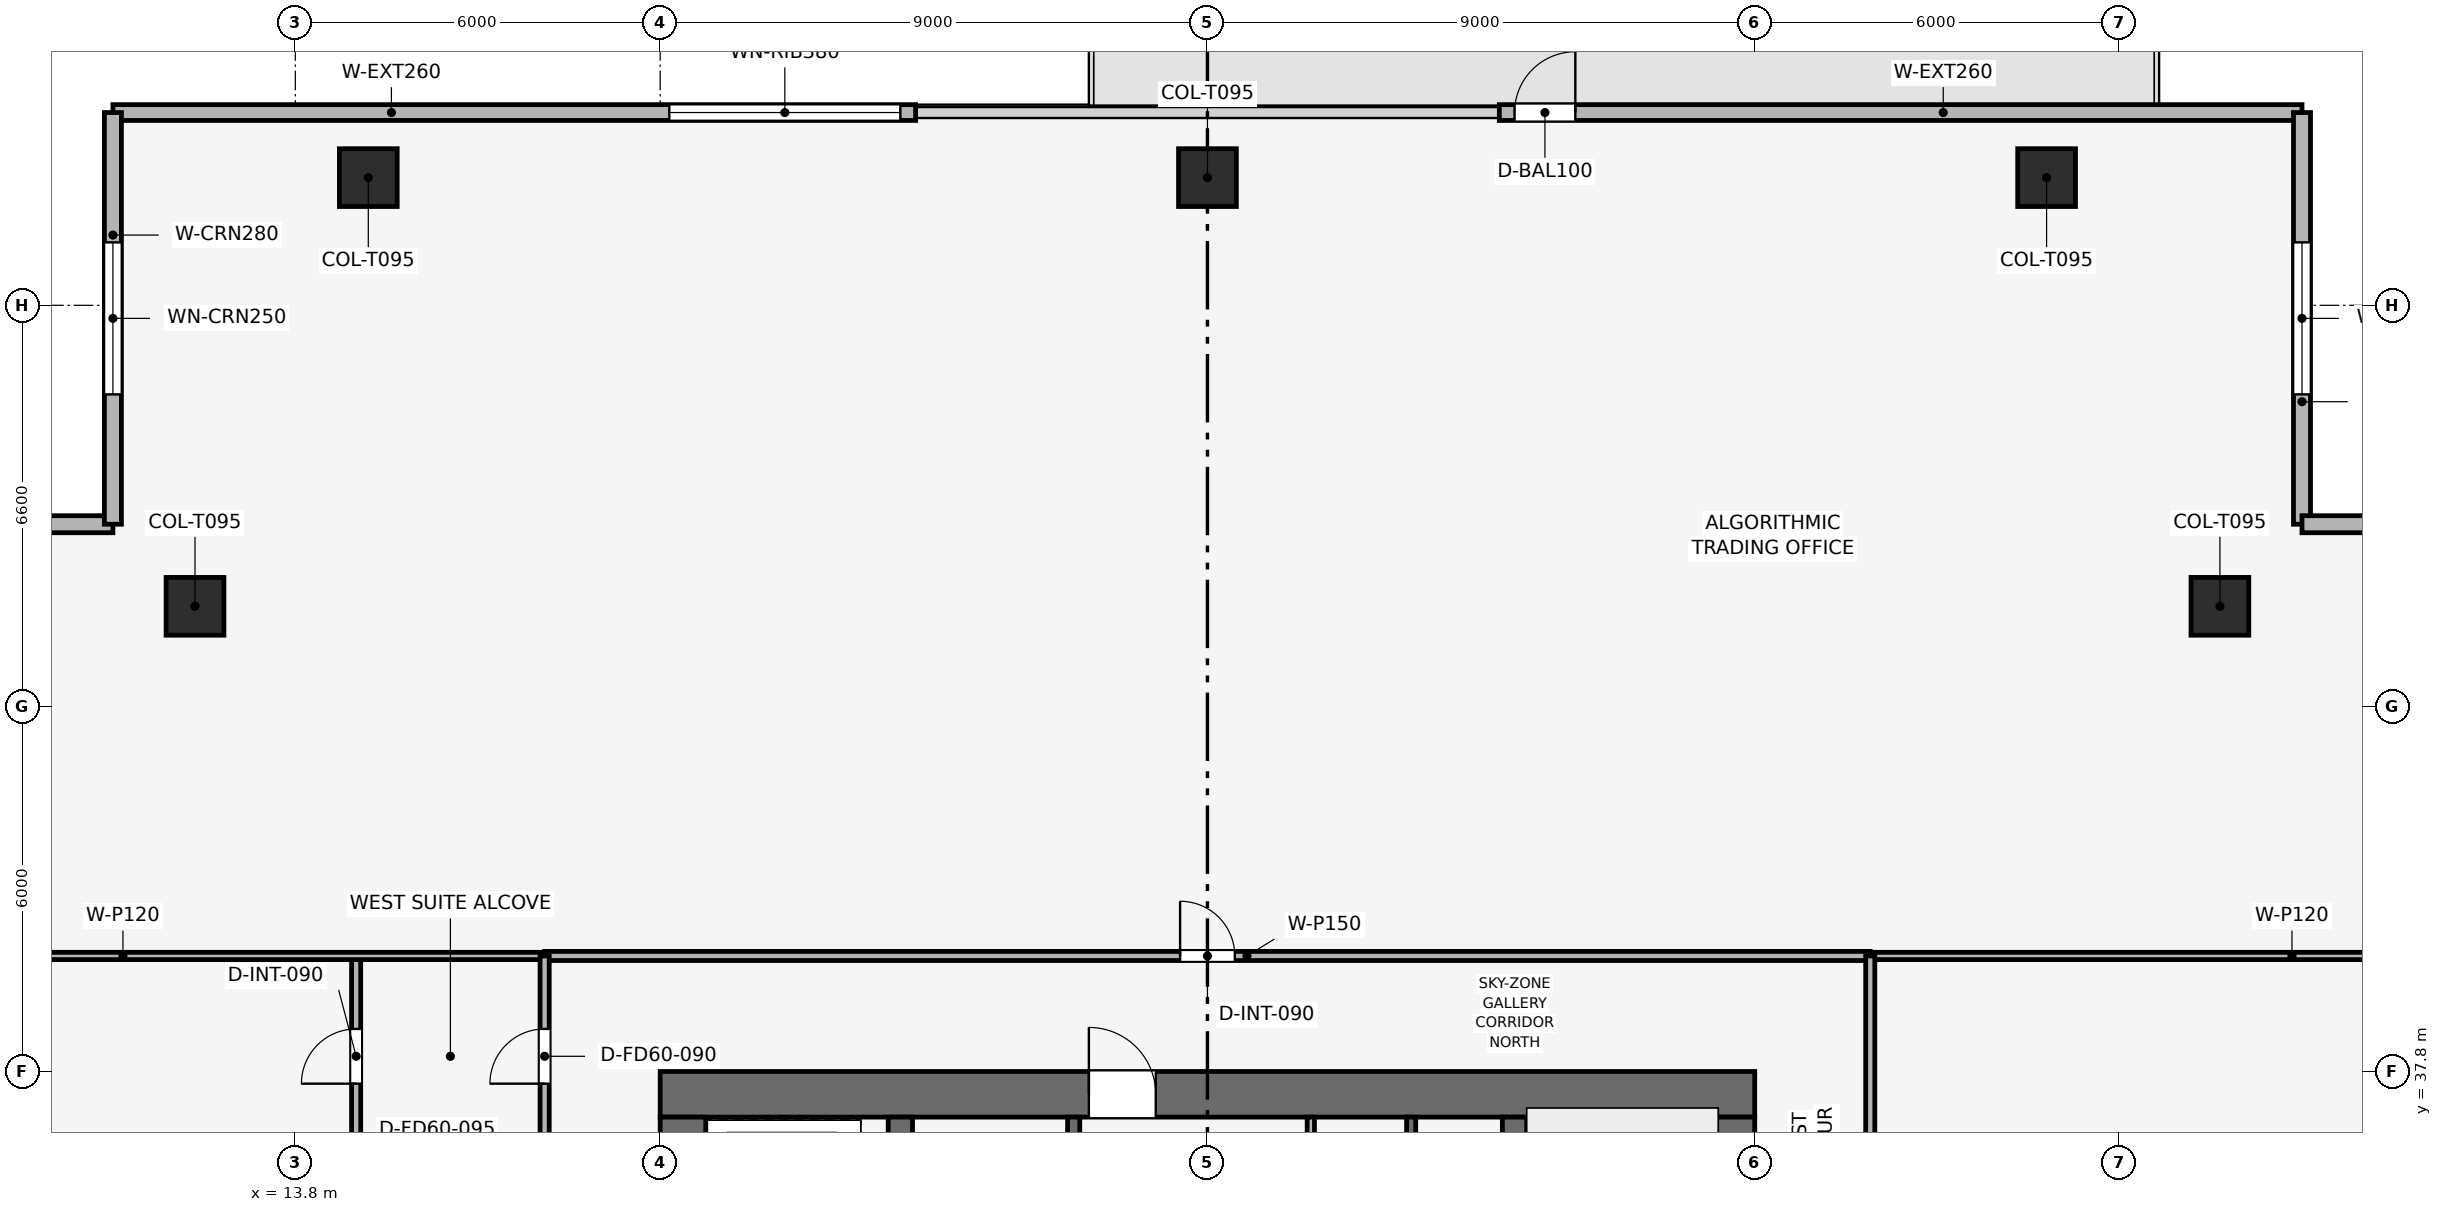
"""IFC4 building model, lengths in metres.
Left out: names, types, materials, properties, quantities, classifications, styles, units other than length and angle.
Written with IfcOpenShell. Run it as: python <this file> out.ifc"""

import sys

from ifc_helpers import new_model, si_unit, direction, frame, frame_2d, origin, origin_2d, place, context, subcontext, project, spatial, rectangle, extrude, element, fill, save


model = new_model("IFC4")
c1 = context("Model", 3, precision=1e-05, world=origin(), true_north=direction((0.0, 1.0)))
c2 = subcontext(c1, "Body", "Model", "MODEL_VIEW")
j1 = project(units=[si_unit("LENGTHUNIT", "METRE"), si_unit("PLANEANGLEUNIT", "RADIAN")], contexts=[c1])
p1 = place(None, origin())
s1 = spatial("IfcSite", under=j1, at=p1, CompositionType="ELEMENT")
p2 = place(p1, origin())
s2 = spatial("IfcBuilding", under=s1, at=p2, CompositionType="ELEMENT")
p3 = place(p2, frame((0.0, 0.0, 276.6)))
s3 = spatial("IfcBuildingStorey", under=s2, at=p3, CompositionType="ELEMENT", Elevation=276.6)
p4 = place(p3, frame((19.8, 37.425, 0.0), z_axis=(0.0, 0.0, 1.0), x_axis=(1.0, 0.0, 0.0)))
e1 = element("IfcWall", 1, at=p4, inside=s3, PredefinedType="SHEAR", context=c2, shape_type="SweptSolid", body=[
    extrude(rectangle(XDim=18.0, YDim=0.75, at=frame_2d((9.0, 0.0))), origin(), (0.0, 0.0, 1.0), 3.75),
])
p5 = place(p4, frame((7.05, 0.0, 0.0)))
e2 = element("IfcOpeningElement", 2, at=p5, cuts=e1, PredefinedType="OPENING", context=c2, shape_type="SweptSolid", body=[
    extrude(rectangle(XDim=1.1, YDim=2.15, at=frame_2d((0.55, 1.075))), frame((0.0, 0.385, 0.0), z_axis=(0.0, -1.0, 0.0), x_axis=(1.0, 0.0, 0.0)), (0.0, 0.0, 1.0), 0.77),
])
p6 = place(p3, frame((20.175, 20.55, 0.0), z_axis=(0.0, 0.0, 1.0), x_axis=(0.0, 1.0, 0.0)))
e3 = element("IfcWall", 3, at=p6, inside=s3, PredefinedType="SHEAR", context=c2, shape_type="SweptSolid", body=[
    extrude(rectangle(XDim=16.5, YDim=0.75, at=frame_2d((8.25, 0.0))), origin(), (0.0, 0.0, 1.0), 3.75),
])
p7 = place(p6, frame((10.25, 0.0, 0.0)))
e4 = element("IfcOpeningElement", 4, at=p7, cuts=e3, PredefinedType="OPENING", context=c2, shape_type="SweptSolid", body=[
    extrude(rectangle(XDim=1.1, YDim=2.15, at=frame_2d((0.55, 1.075))), frame((0.0, 0.385, 0.0), z_axis=(0.0, -1.0, 0.0), x_axis=(1.0, 0.0, 0.0)), (0.0, 0.0, 1.0), 0.77),
])
p8 = place(p3, frame((37.425, 20.55, 0.0), z_axis=(0.0, 0.0, 1.0), x_axis=(0.0, 1.0, 0.0)))
e5 = element("IfcWall", 5, at=p8, inside=s3, PredefinedType="SHEAR", context=c2, shape_type="SweptSolid", body=[
    extrude(rectangle(XDim=16.5, YDim=0.75, at=frame_2d((8.25, 0.0))), origin(), (0.0, 0.0, 1.0), 3.75),
])
p9 = place(p8, frame((4.75, 0.0, 0.0)))
e6 = element("IfcOpeningElement", 6, at=p9, cuts=e5, PredefinedType="OPENING", context=c2, shape_type="SweptSolid", body=[
    extrude(rectangle(XDim=1.1, YDim=2.15, at=frame_2d((0.55, 1.075))), frame((0.0, 0.385, 0.0), z_axis=(0.0, -1.0, 0.0), x_axis=(1.0, 0.0, 0.0)), (0.0, 0.0, 1.0), 0.77),
])
for number, where, z_axis, x_axis in (
    (7, (23.75, 20.55, 0.0), (0.0, 0.0, 1.0), (0.0, 1.0, 0.0)),
    (8, (33.85, 20.55, 0.0), (0.0, 0.0, 1.0), (0.0, 1.0, 0.0)),
):
    element("IfcWall", number, at=place(p3, frame(where, z_axis=z_axis, x_axis=x_axis)), inside=s3, PredefinedType="SHEAR", context=c2, shape_type="SweptSolid", body=[
        extrude(rectangle(XDim=16.5, YDim=0.4, at=frame_2d((8.25, 0.0))), origin(), (0.0, 0.0, 1.0), 3.75),
    ])
for number, where, z_axis, x_axis in (
    (9, (42.6, 52.5, 0.003), (0.0, 0.0, 1.0), (1.0, 0.0, 0.0)),
    (10, (28.8, 52.5, 0.003), (0.0, 0.0, 1.0), (1.0, 0.0, 0.0)),
    (11, (15.0, 52.5, 0.003), (0.0, 0.0, 1.0), (1.0, 0.0, 0.0)),
    (12, (45.45, 45.45, 0.003), (0.0, 0.0, 1.0), (1.0, 0.0, 0.0)),
    (13, (12.15, 45.45, 0.003), (0.0, 0.0, 1.0), (1.0, 0.0, 0.0)),
):
    element("IfcColumn", number, at=place(p3, frame(where, z_axis=z_axis, x_axis=x_axis)), inside=s3, PredefinedType="COLUMN", context=c2, shape_type="SweptSolid", body=[
        extrude(rectangle(XDim=0.95, YDim=0.95, at=origin_2d()), origin(), (0.0, 0.0, 1.0), 3.494),
    ])
p10 = place(p3, frame((10.8, 53.57, 0.0), z_axis=(0.0, 0.0, 1.0), x_axis=(1.0, 0.0, 0.0)))
e14 = element("IfcWall", 14, at=p10, inside=s3, PredefinedType="SOLIDWALL", context=c2, shape_type="SweptSolid", body=[
    extrude(rectangle(XDim=13.2, YDim=0.26, at=frame_2d((6.6, 0.0))), origin(), (0.0, 0.0, 1.0), 3.5),
])
p11 = place(p10, frame((9.15, 0.0, 0.9)))
e15 = element("IfcOpeningElement", 15, at=p11, cuts=e14, PredefinedType="OPENING", context=c2, shape_type="SweptSolid", body=[
    extrude(rectangle(XDim=3.8, YDim=1.9, at=frame_2d((1.9, 0.95))), frame((0.0, 0.14, 0.0), z_axis=(0.0, -1.0, 0.0), x_axis=(1.0, 0.0, 0.0)), (0.0, 0.0, 1.0), 0.28),
])
p12 = place(p3, frame((33.6, 53.57, 0.0), z_axis=(0.0, 0.0, 1.0), x_axis=(1.0, 0.0, 0.0)))
e16 = element("IfcWall", 16, at=p12, inside=s3, PredefinedType="SOLIDWALL", context=c2, shape_type="SweptSolid", body=[
    extrude(rectangle(XDim=13.2, YDim=0.26, at=frame_2d((6.6, 0.0))), origin(), (0.0, 0.0, 1.0), 3.5),
])
p13 = place(p12, frame((0.25, 0.0, 0.0)))
e17 = element("IfcOpeningElement", 17, at=p13, cuts=e16, PredefinedType="OPENING", context=c2, shape_type="SweptSolid", body=[
    extrude(rectangle(XDim=1.0, YDim=2.2, at=frame_2d((0.5, 1.1))), frame((0.0, 0.14, 0.0), z_axis=(0.0, -1.0, 0.0), x_axis=(1.0, 0.0, 0.0)), (0.0, 0.0, 1.0), 0.28),
])
p14 = place(p3, frame((4.03, 46.8, 0.0), z_axis=(0.0, 0.0, 1.0), x_axis=(1.0, 0.0, 0.0)))
e18 = element("IfcWall", 18, at=p14, inside=s3, PredefinedType="SOLIDWALL", context=c2, shape_type="SweptSolid", body=[
    extrude(rectangle(XDim=6.77, YDim=0.28, at=frame_2d((3.385, 0.0))), origin(), (0.0, 0.0, 1.0), 3.5),
])
p15 = place(p14, frame((2.135, 0.0, 0.9)))
e19 = element("IfcOpeningElement", 19, at=p15, cuts=e18, PredefinedType="OPENING", context=c2, shape_type="SweptSolid", body=[
    extrude(rectangle(XDim=2.5, YDim=1.9, at=frame_2d((1.25, 0.95))), frame((0.0, 0.15, 0.0), z_axis=(0.0, -1.0, 0.0), x_axis=(1.0, 0.0, 0.0)), (0.0, 0.0, 1.0), 0.3),
])
p16 = place(p3, frame((10.8, 46.8, 0.0), z_axis=(0.0, 0.0, 1.0), x_axis=(0.0, 1.0, 0.0)))
e20 = element("IfcWall", 20, at=p16, inside=s3, PredefinedType="SOLIDWALL", context=c2, shape_type="SweptSolid", body=[
    extrude(rectangle(XDim=6.77, YDim=0.28, at=frame_2d((3.385, 0.0))), origin(), (0.0, 0.0, 1.0), 3.5),
])
p17 = place(p16, frame((2.135, 0.0, 0.9)))
e21 = element("IfcOpeningElement", 21, at=p17, cuts=e20, PredefinedType="OPENING", context=c2, shape_type="SweptSolid", body=[
    extrude(rectangle(XDim=2.5, YDim=1.9, at=frame_2d((1.25, 0.95))), frame((0.0, 0.15, 0.0), z_axis=(0.0, -1.0, 0.0), x_axis=(1.0, 0.0, 0.0)), (0.0, 0.0, 1.0), 0.3),
])
p18 = place(p3, frame((46.8, 53.57, 0.0), z_axis=(0.0, 0.0, 1.0), x_axis=(0.0, -1.0, 0.0)))
e22 = element("IfcWall", 22, at=p18, inside=s3, PredefinedType="SOLIDWALL", context=c2, shape_type="SweptSolid", body=[
    extrude(rectangle(XDim=6.77, YDim=0.28, at=frame_2d((3.385, 0.0))), origin(), (0.0, 0.0, 1.0), 3.5),
])
p19 = place(p18, frame((2.135, 0.0, 0.9)))
e23 = element("IfcOpeningElement", 23, at=p19, cuts=e22, PredefinedType="OPENING", context=c2, shape_type="SweptSolid", body=[
    extrude(rectangle(XDim=2.5, YDim=1.9, at=frame_2d((1.25, 0.95))), frame((0.0, 0.15, 0.0), z_axis=(0.0, -1.0, 0.0), x_axis=(1.0, 0.0, 0.0)), (0.0, 0.0, 1.0), 0.3),
])
p20 = place(p3, frame((46.8, 46.8, 0.0), z_axis=(0.0, 0.0, 1.0), x_axis=(1.0, 0.0, 0.0)))
e24 = element("IfcWall", 24, at=p20, inside=s3, PredefinedType="SOLIDWALL", context=c2, shape_type="SweptSolid", body=[
    extrude(rectangle(XDim=6.77, YDim=0.28, at=frame_2d((3.385, 0.0))), origin(), (0.0, 0.0, 1.0), 3.5),
])
p21 = place(p20, frame((2.135, 0.0, 0.9)))
e25 = element("IfcOpeningElement", 25, at=p21, cuts=e24, PredefinedType="OPENING", context=c2, shape_type="SweptSolid", body=[
    extrude(rectangle(XDim=2.5, YDim=1.9, at=frame_2d((1.25, 0.95))), frame((0.0, 0.15, 0.0), z_axis=(0.0, -1.0, 0.0), x_axis=(1.0, 0.0, 0.0)), (0.0, 0.0, 1.0), 0.3),
])
p22 = place(p3, frame((32.15, 34.0, 0.0), z_axis=(0.0, 0.0, 1.0), x_axis=(0.0, 1.0, 0.0)))
e26 = element("IfcWall", 26, at=p22, inside=s3, PredefinedType="SHEAR", context=c2, shape_type="SweptSolid", body=[
    extrude(rectangle(XDim=3.05, YDim=0.15, at=frame_2d((1.525, 0.0))), origin(), (0.0, 0.0, 1.0), 3.5),
])
p23 = place(p3, frame((26.6, 34.0, 0.0), z_axis=(0.0, 0.0, 1.0), x_axis=(0.0, 1.0, 0.0)))
e27 = element("IfcWall", 27, at=p23, inside=s3, PredefinedType="SHEAR", context=c2, shape_type="SweptSolid", body=[
    extrude(rectangle(XDim=3.05, YDim=0.2, at=frame_2d((1.525, 0.0))), origin(), (0.0, 0.0, 1.0), 3.5),
])
p24 = place(p23, frame((0.75, 0.0, 0.0)))
e28 = element("IfcOpeningElement", 28, at=p24, cuts=e27, PredefinedType="OPENING", context=c2, shape_type="SweptSolid", body=[
    extrude(rectangle(XDim=1.1, YDim=2.15, at=frame_2d((0.55, 1.075))), frame((0.0, 0.11, 0.0), z_axis=(0.0, -1.0, 0.0), x_axis=(1.0, 0.0, 0.0)), (0.0, 0.0, 1.0), 0.22),
])
p25 = place(p3, frame((30.5, 33.925, 0.0), z_axis=(0.0, 0.0, 1.0), x_axis=(0.0, 1.0, 0.0)))
e29 = element("IfcWall", 29, at=p25, inside=s3, PredefinedType="PARTITIONING", context=c2, shape_type="SweptSolid", body=[
    extrude(rectangle(XDim=3.125, YDim=0.12, at=frame_2d((1.562, 0.0))), origin(), (0.0, 0.0, 1.0), 3.5),
])
p26 = place(p25, frame((0.85, 0.0, 0.0)))
e30 = element("IfcOpeningElement", 30, at=p26, cuts=e29, PredefinedType="OPENING", context=c2, shape_type="SweptSolid", body=[
    extrude(rectangle(XDim=0.9, YDim=2.1, at=frame_2d((0.45, 1.05))), frame((0.0, 0.07, 0.0), z_axis=(0.0, -1.0, 0.0), x_axis=(1.0, 0.0, 0.0)), (0.0, 0.0, 1.0), 0.14),
])
p27 = place(p3, frame((14.8, 28.0, 0.0), z_axis=(0.0, 0.0, 1.0), x_axis=(0.0, 1.0, 0.0)))
e31 = element("IfcWall", 31, at=p27, inside=s3, PredefinedType="PARTITIONING", context=c2, shape_type="SweptSolid", body=[
    extrude(rectangle(XDim=11.7, YDim=0.15, at=frame_2d((5.85, 0.0))), origin(), (0.0, 0.0, 1.0), 3.085),
])
p28 = place(p27, frame((9.6, 0.0, 0.0)))
e32 = element("IfcOpeningElement", 32, at=p28, cuts=e31, PredefinedType="OPENING", context=c2, shape_type="SweptSolid", body=[
    extrude(rectangle(XDim=0.9, YDim=2.1, at=frame_2d((0.45, 1.05))), frame((0.0, 0.085, 0.0), z_axis=(0.0, -1.0, 0.0), x_axis=(1.0, 0.0, 0.0)), (0.0, 0.0, 1.0), 0.17),
])
p29 = place(p3, frame((4.03, 39.7, 0.0), z_axis=(0.0, 0.0, 1.0), x_axis=(1.0, 0.0, 0.0)))
e33 = element("IfcWall", 33, at=p29, inside=s3, PredefinedType="PARTITIONING", context=c2, shape_type="SweptSolid", body=[
    extrude(rectangle(XDim=13.87, YDim=0.12, at=frame_2d((6.935, 0.0))), origin(), (0.0, 0.0, 1.0), 3.085),
])
p30 = place(p3, frame((39.7, 39.7, 0.0), z_axis=(0.0, 0.0, 1.0), x_axis=(1.0, 0.0, 0.0)))
e34 = element("IfcWall", 34, at=p30, inside=s3, PredefinedType="PARTITIONING", context=c2, shape_type="SweptSolid", body=[
    extrude(rectangle(XDim=13.87, YDim=0.12, at=frame_2d((6.935, 0.0))), origin(), (0.0, 0.0, 1.0), 3.085),
])
p31 = place(p3, frame((17.9, 39.7, 0.0), z_axis=(0.0, 0.0, 1.0), x_axis=(1.0, 0.0, 0.0)))
e35 = element("IfcWall", 35, at=p31, inside=s3, PredefinedType="PARTITIONING", context=c2, shape_type="SweptSolid", body=[
    extrude(rectangle(XDim=21.8, YDim=0.15, at=frame_2d((10.9, 0.0))), origin(), (0.0, 0.0, 1.0), 3.085),
])
p32 = place(p31, frame((10.45, 0.0, 0.0)))
e36 = element("IfcOpeningElement", 36, at=p32, cuts=e35, PredefinedType="OPENING", context=c2, shape_type="SweptSolid", body=[
    extrude(rectangle(XDim=0.9, YDim=2.1, at=frame_2d((0.45, 1.05))), frame((0.0, 0.085, 0.0), z_axis=(0.0, -1.0, 0.0), x_axis=(1.0, 0.0, 0.0)), (0.0, 0.0, 1.0), 0.17),
])
p33 = place(p3, frame((17.9, 10.8, 0.0), z_axis=(0.0, 0.0, 1.0), x_axis=(0.0, 1.0, 0.0)))
e37 = element("IfcWall", 37, at=p33, inside=s3, PredefinedType="PARTITIONING", context=c2, shape_type="SweptSolid", body=[
    extrude(rectangle(XDim=28.9, YDim=0.15, at=frame_2d((14.45, 0.0))), origin(), (0.0, 0.0, 1.0), 3.085),
])
p34 = place(p33, frame((8.15, 0.0, 0.0)))
e38 = element("IfcOpeningElement", 38, at=p34, cuts=e37, PredefinedType="OPENING", context=c2, shape_type="SweptSolid", body=[
    extrude(rectangle(XDim=0.9, YDim=2.1, at=frame_2d((0.45, 1.05))), frame((0.0, 0.085, 0.0), z_axis=(0.0, -1.0, 0.0), x_axis=(1.0, 0.0, 0.0)), (0.0, 0.0, 1.0), 0.17),
])
p35 = place(p33, frame((18.15, 0.0, 0.0)))
e39 = element("IfcOpeningElement", 39, at=p35, cuts=e37, PredefinedType="OPENING", context=c2, shape_type="SweptSolid", body=[
    extrude(rectangle(XDim=0.9, YDim=2.1, at=frame_2d((0.45, 1.05))), frame((0.0, 0.085, 0.0), z_axis=(0.0, -1.0, 0.0), x_axis=(1.0, 0.0, 0.0)), (0.0, 0.0, 1.0), 0.17),
])
p36 = place(p33, frame((21.05, 0.0, 0.0)))
e40 = element("IfcOpeningElement", 40, at=p36, cuts=e37, PredefinedType="OPENING", context=c2, shape_type="SweptSolid", body=[
    extrude(rectangle(XDim=0.9, YDim=2.1, at=frame_2d((0.45, 1.05))), frame((0.0, 0.085, 0.0), z_axis=(0.0, -1.0, 0.0), x_axis=(1.0, 0.0, 0.0)), (0.0, 0.0, 1.0), 0.17),
])
p37 = place(p33, frame((23.8, 0.0, 0.0)))
e41 = element("IfcOpeningElement", 41, at=p37, cuts=e37, PredefinedType="OPENING", context=c2, shape_type="SweptSolid", body=[
    extrude(rectangle(XDim=0.95, YDim=2.1, at=frame_2d((0.475, 1.05))), frame((0.0, 0.085, 0.0), z_axis=(0.0, -1.0, 0.0), x_axis=(1.0, 0.0, 0.0)), (0.0, 0.0, 1.0), 0.17),
])
p38 = place(p33, frame((26.8, 0.0, 0.0)))
e42 = element("IfcOpeningElement", 42, at=p38, cuts=e37, PredefinedType="OPENING", context=c2, shape_type="SweptSolid", body=[
    extrude(rectangle(XDim=0.9, YDim=2.1, at=frame_2d((0.45, 1.05))), frame((0.0, 0.085, 0.0), z_axis=(0.0, -1.0, 0.0), x_axis=(1.0, 0.0, 0.0)), (0.0, 0.0, 1.0), 0.17),
])
p39 = place(p3, frame((39.7, 24.4, 0.0), z_axis=(0.0, 0.0, 1.0), x_axis=(0.0, 1.0, 0.0)))
e43 = element("IfcWall", 43, at=p39, inside=s3, PredefinedType="PARTITIONING", context=c2, shape_type="SweptSolid", body=[
    extrude(rectangle(XDim=15.3, YDim=0.15, at=frame_2d((7.65, 0.0))), origin(), (0.0, 0.0, 1.0), 3.085),
])
p40 = place(p39, frame((7.2, 0.0, 0.0)))
e44 = element("IfcOpeningElement", 44, at=p40, cuts=e43, PredefinedType="OPENING", context=c2, shape_type="SweptSolid", body=[
    extrude(rectangle(XDim=0.9, YDim=2.1, at=frame_2d((0.45, 1.05))), frame((0.0, 0.085, 0.0), z_axis=(0.0, -1.0, 0.0), x_axis=(1.0, 0.0, 0.0)), (0.0, 0.0, 1.0), 0.17),
])
p41 = place(p13, origin())
e45 = element("IfcDoor", 45, at=p41, inside=s3, OperationType="SINGLE_SWING_RIGHT", PredefinedType="DOOR", context=c2, shape_type="SweptSolid", body=[
    extrude(rectangle(XDim=1.0, YDim=2.2, at=frame_2d((0.5, 1.1))), frame((0.0, 0.025, 0.0), z_axis=(0.0, -1.0, 0.0), x_axis=(1.0, 0.0, 0.0)), (0.0, 0.0, 1.0), 0.05),
])
fill(e17, e45)
p42 = place(p11, origin())
e46 = element("IfcWindow", 46, at=p42, inside=s3, PartitioningType="SINGLE_PANEL", PredefinedType="WINDOW", context=c2, shape_type="SweptSolid", body=[
    extrude(rectangle(XDim=3.8, YDim=1.9, at=frame_2d((1.9, 0.95))), frame((0.0, 0.03, 0.0), z_axis=(0.0, -1.0, 0.0), x_axis=(1.0, 0.0, 0.0)), (0.0, 0.0, 1.0), 0.06),
])
fill(e15, e46)
p43 = place(p17, origin())
e47 = element("IfcWindow", 47, at=p43, inside=s3, PartitioningType="SINGLE_PANEL", PredefinedType="WINDOW", context=c2, shape_type="SweptSolid", body=[
    extrude(rectangle(XDim=2.5, YDim=1.9, at=frame_2d((1.25, 0.95))), frame((0.0, 0.03, 0.0), z_axis=(0.0, -1.0, 0.0), x_axis=(1.0, 0.0, 0.0)), (0.0, 0.0, 1.0), 0.06),
])
fill(e21, e47)
p44 = place(p19, origin())
e48 = element("IfcWindow", 48, at=p44, inside=s3, PartitioningType="SINGLE_PANEL", PredefinedType="WINDOW", context=c2, shape_type="SweptSolid", body=[
    extrude(rectangle(XDim=2.5, YDim=1.9, at=frame_2d((1.25, 0.95))), frame((0.0, 0.03, 0.0), z_axis=(0.0, -1.0, 0.0), x_axis=(1.0, 0.0, 0.0)), (0.0, 0.0, 1.0), 0.06),
])
fill(e23, e48)
p45 = place(p28, origin())
e49 = element("IfcDoor", 49, at=p45, inside=s3, OperationType="SINGLE_SWING_LEFT", PredefinedType="DOOR", context=c2, shape_type="SweptSolid", body=[
    extrude(rectangle(XDim=0.9, YDim=2.1, at=frame_2d((0.45, 1.05))), frame((0.0, 0.025, 0.0), z_axis=(0.0, -1.0, 0.0), x_axis=(1.0, 0.0, 0.0)), (0.0, 0.0, 1.0), 0.05),
])
fill(e32, e49)
p46 = place(p32, origin())
e50 = element("IfcDoor", 50, at=p46, inside=s3, OperationType="SINGLE_SWING_LEFT", PredefinedType="DOOR", context=c2, shape_type="SweptSolid", body=[
    extrude(rectangle(XDim=0.9, YDim=2.1, at=frame_2d((0.45, 1.05))), frame((0.0, 0.025, 0.0), z_axis=(0.0, -1.0, 0.0), x_axis=(1.0, 0.0, 0.0)), (0.0, 0.0, 1.0), 0.05),
])
fill(e36, e50)
p47 = place(p38, origin())
e51 = element("IfcDoor", 51, at=p47, inside=s3, OperationType="SINGLE_SWING_LEFT", PredefinedType="DOOR", context=c2, shape_type="SweptSolid", body=[
    extrude(rectangle(XDim=0.9, YDim=2.1, at=frame_2d((0.45, 1.05))), frame((0.0, 0.025, 0.0), z_axis=(0.0, -1.0, 0.0), x_axis=(1.0, 0.0, 0.0)), (0.0, 0.0, 1.0), 0.05),
])
fill(e42, e51)
p48 = place(p5, origin())
e52 = element("IfcDoor", 52, at=p48, inside=s3, OperationType="SINGLE_SWING_LEFT", PredefinedType="DOOR", context=c2, shape_type="SweptSolid", body=[
    extrude(rectangle(XDim=1.1, YDim=2.15, at=frame_2d((0.55, 1.075))), frame((0.0, 0.025, 0.0), z_axis=(0.0, -1.0, 0.0), x_axis=(1.0, 0.0, 0.0)), (0.0, 0.0, 1.0), 0.05),
])
fill(e2, e52)
save(model, sys.argv[1])
